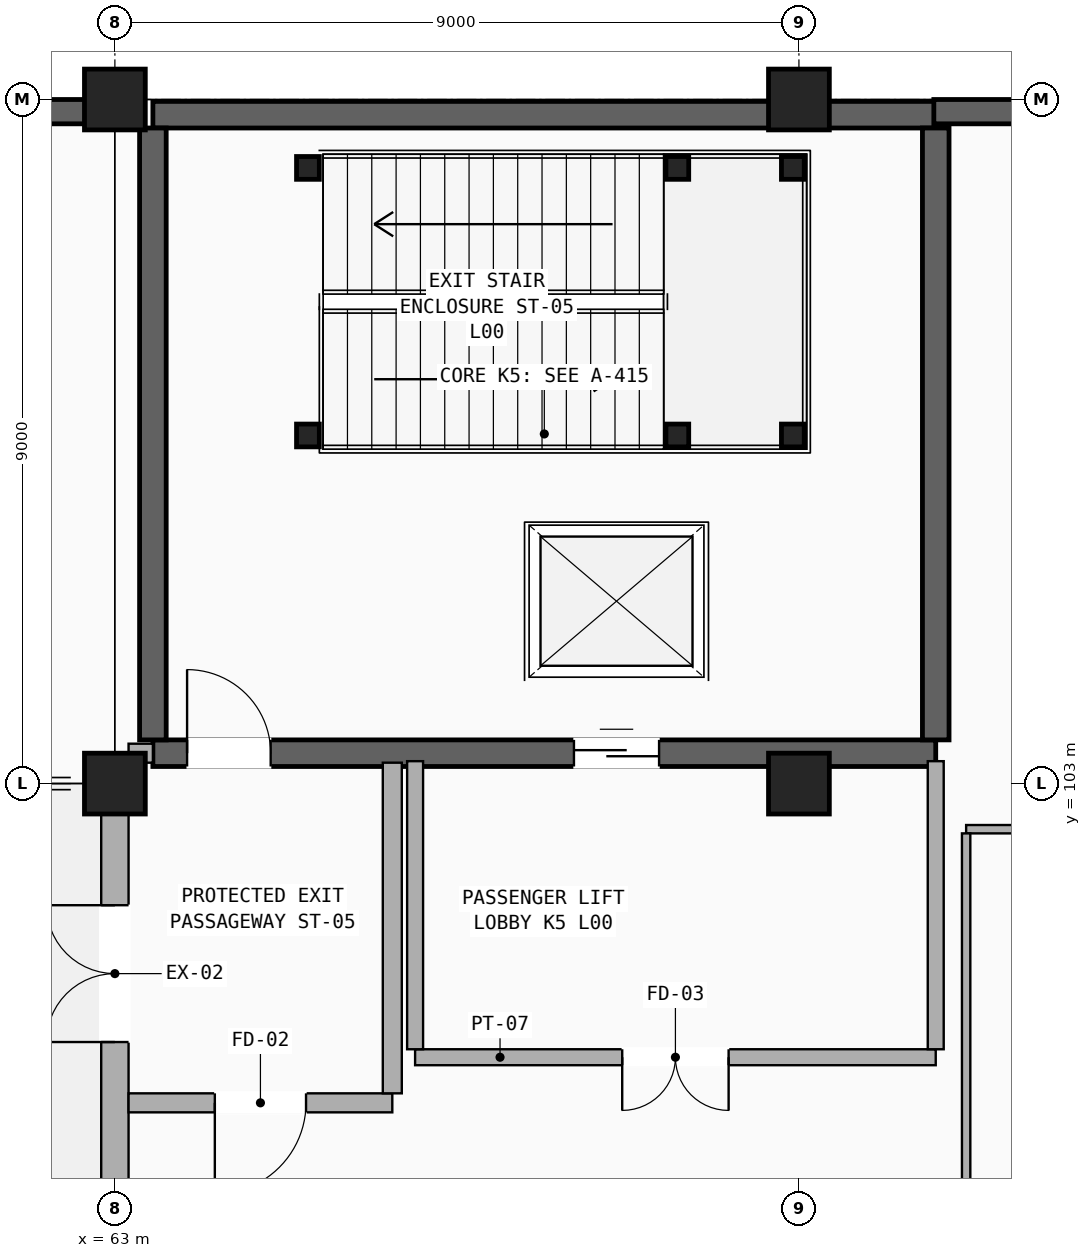
"""IFC4 building model, lengths in metres.
Left out: names, types, materials, properties, quantities, classifications, styles, units other than length and angle.
Written with IfcOpenShell. Run it as: python <this file> out.ifc"""

import sys

from ifc_helpers import new_model, si_unit, direction, frame, frame_2d, origin, origin_2d, place, context, subcontext, project, spatial, rectangle, hollow_rectangle, extrude, element, fill, save


model = new_model("IFC4")
c1 = context("Model", 3, precision=1e-05, world=origin(), true_north=direction((0.0, 1.0)))
c2 = subcontext(c1, "Body", "Model", "MODEL_VIEW")
j1 = project(units=[si_unit("LENGTHUNIT", "METRE"), si_unit("PLANEANGLEUNIT", "RADIAN")], contexts=[c1])
p1 = place(None, origin())
s1 = spatial("IfcSite", under=j1, at=p1, CompositionType="ELEMENT")
p2 = place(p1, origin())
s2 = spatial("IfcBuilding", under=s1, at=p2, CompositionType="ELEMENT")
p3 = place(p2, origin())
s3 = spatial("IfcBuildingStorey", under=s2, at=p3, CompositionType="ELEMENT", Elevation=0.0)
for number, where, z_axis, x_axis in (
    (1, (63.0, 103.0, 0.0), (0.0, 0.0, 1.0), (1.0, 0.0, 0.0)),
    (2, (63.0, 112.0, 0.0), (0.0, 0.0, 1.0), (1.0, 0.0, 0.0)),
    (3, (72.0, 103.0, 0.0), (0.0, 0.0, 1.0), (1.0, 0.0, 0.0)),
    (4, (72.0, 112.0, 0.0), (0.0, 0.0, 1.0), (1.0, 0.0, 0.0)),
):
    element("IfcColumn", number, at=place(p3, frame(where, z_axis=z_axis, x_axis=x_axis)), inside=s3, PredefinedType="COLUMN", context=c2, shape_type="SweptSolid", body=[
        extrude(rectangle(XDim=0.8, YDim=0.8, at=origin_2d()), origin(), (0.0, 0.0, 1.0), 5.1),
    ])
p4 = place(p3, frame((63.5, 103.4, 0.0), z_axis=(0.0, 0.0, 1.0), x_axis=(1.0, 0.0, 0.0)))
e5 = element("IfcWall", 5, at=p4, inside=s3, PredefinedType="SHEAR", context=c2, shape_type="SweptSolid", body=[
    extrude(rectangle(XDim=10.3, YDim=0.35, at=frame_2d((5.15, 0.0))), origin(), (0.0, 0.0, 1.0), 5.1),
])
p5 = place(p4, frame((0.45, 0.0, 0.0)))
e6 = element("IfcOpeningElement", 6, at=p5, cuts=e5, PredefinedType="OPENING", context=c2, shape_type="SweptSolid", body=[
    extrude(rectangle(XDim=1.1, YDim=2.2, at=frame_2d((0.55, 1.1))), frame((0.0, 0.185, 0.0), z_axis=(0.0, -1.0, 0.0), x_axis=(1.0, 0.0, 0.0)), (0.0, 0.0, 1.0), 0.37),
])
p6 = place(p4, frame((5.54, 0.0, 0.0)))
e7 = element("IfcOpeningElement", 7, at=p6, cuts=e5, PredefinedType="OPENING", context=c2, shape_type="SweptSolid", body=[
    extrude(rectangle(XDim=1.12, YDim=2.16, at=frame_2d((0.56, 1.08))), frame((0.0, 0.185, 0.0), z_axis=(0.0, -1.0, 0.0), x_axis=(1.0, 0.0, 0.0)), (0.0, 0.0, 1.0), 0.37),
])
p7 = place(p3, frame((63.5, 111.8, 0.0), z_axis=(0.0, 0.0, 1.0), x_axis=(1.0, 0.0, 0.0)))
e8 = element("IfcWall", 8, at=p7, inside=s3, PredefinedType="SHEAR", context=c2, shape_type="SweptSolid", body=[
    extrude(rectangle(XDim=10.3, YDim=0.35, at=frame_2d((5.15, 0.0))), origin(), (0.0, 0.0, 1.0), 5.1),
])
for number, where, z_axis, x_axis in (
    (9, (63.5, 103.575, 0.0), (0.0, 0.0, 1.0), (0.0, 1.0, 0.0)),
    (10, (73.8, 103.575, 0.0), (0.0, 0.0, 1.0), (0.0, 1.0, 0.0)),
):
    element("IfcWall", number, at=place(p3, frame(where, z_axis=z_axis, x_axis=x_axis)), inside=s3, PredefinedType="SHEAR", context=c2, shape_type="SweptSolid", body=[
        extrude(rectangle(XDim=8.05, YDim=0.35, at=frame_2d((4.025, 0.0))), origin(), (0.0, 0.0, 1.0), 5.1),
    ])
p8 = place(p3, frame((0.35, 111.84, 0.0), z_axis=(0.0, 0.0, 1.0), x_axis=(1.0, 0.0, 0.0)))
e11 = element("IfcWall", 11, at=p8, inside=s3, PredefinedType="SHEAR", context=c2, shape_type="SweptSolid", body=[
    extrude(rectangle(XDim=62.95, YDim=0.32, at=frame_2d((31.475, 0.0))), origin(), (0.0, 0.0, 1.0), 5.1),
])
p9 = place(p3, frame((73.775, 111.84, 0.0), z_axis=(0.0, 0.0, 1.0), x_axis=(1.0, 0.0, 0.0)))
e12 = element("IfcWall", 12, at=p9, inside=s3, PredefinedType="SHEAR", context=c2, shape_type="SweptSolid", body=[
    extrude(rectangle(XDim=89.875, YDim=0.32, at=frame_2d((44.938, 0.0))), origin(), (0.0, 0.0, 1.0), 5.1),
])
p10 = place(p3, frame((63.0, 94.4, 0.0), z_axis=(0.0, 0.0, 1.0), x_axis=(0.0, 1.0, 0.0)))
e13 = element("IfcWall", 13, at=p10, inside=s3, PredefinedType="STANDARD", context=c2, shape_type="SweptSolid", body=[
    extrude(rectangle(XDim=8.2, YDim=0.36, at=frame_2d((4.1, 0.0))), origin(), (0.0, 0.0, 1.0), 4.13),
])
p11 = place(p10, frame((5.2, 0.0, 0.0)))
e14 = element("IfcOpeningElement", 14, at=p11, cuts=e13, PredefinedType="OPENING", context=c2, shape_type="SweptSolid", body=[
    extrude(rectangle(XDim=1.8, YDim=2.3, at=frame_2d((0.9, 1.15))), frame((0.0, 0.19, 0.0), z_axis=(0.0, -1.0, 0.0), x_axis=(1.0, 0.0, 0.0)), (0.0, 0.0, 1.0), 0.38),
])
p12 = place(p10, frame((1.25, 0.0, 0.9)))
e15 = element("IfcOpeningElement", 15, at=p12, cuts=e13, PredefinedType="OPENING", context=c2, shape_type="SweptSolid", body=[
    extrude(rectangle(XDim=1.72, YDim=2.15, at=frame_2d((0.86, 1.075))), frame((0.0, 0.19, 0.0), z_axis=(0.0, -1.0, 0.0), x_axis=(1.0, 0.0, 0.0)), (0.0, 0.0, 1.0), 0.38),
])
for number, where, z_axis, x_axis in (
    (16, (65.54, 107.58, 0.0), (0.0, 0.0, 1.0), (1.0, 0.0, 0.0)),
    (17, (65.54, 111.1, 0.0), (0.0, 0.0, 1.0), (1.0, 0.0, 0.0)),
    (18, (70.4, 107.58, 0.0), (0.0, 0.0, 1.0), (1.0, 0.0, 0.0)),
    (19, (70.4, 111.1, 0.0), (0.0, 0.0, 1.0), (1.0, 0.0, 0.0)),
    (20, (71.92, 107.58, 0.0), (0.0, 0.0, 1.0), (1.0, 0.0, 0.0)),
    (21, (71.92, 111.1, 0.0), (0.0, 0.0, 1.0), (1.0, 0.0, 0.0)),
):
    element("IfcColumn", number, at=place(p3, frame(where, z_axis=z_axis, x_axis=x_axis)), inside=s3, PredefinedType="COLUMN", context=c2, shape_type="SweptSolid", body=[
        extrude(hollow_rectangle(XDim=0.3, YDim=0.3, WallThickness=0.016, InnerFilletRadius=0.016, OuterFilletRadius=0.032, at=origin_2d()), origin(), (0.0, 0.0, 1.0), 5.1),
    ])
p13 = place(p3, frame((66.95, 99.4, 0.0), z_axis=(0.0, 0.0, 1.0), x_axis=(1.0, 0.0, 0.0)))
e22 = element("IfcWall", 22, at=p13, inside=s3, PredefinedType="PARTITIONING", context=c2, shape_type="SweptSolid", body=[
    extrude(rectangle(XDim=6.85, YDim=0.21, at=frame_2d((3.425, 0.0))), origin(), (0.0, 0.0, 1.0), 3.98),
])
p14 = place(p13, frame((2.725, 0.0, 0.0)))
e23 = element("IfcOpeningElement", 23, at=p14, cuts=e22, PredefinedType="OPENING", context=c2, shape_type="SweptSolid", body=[
    extrude(rectangle(XDim=1.4, YDim=2.2, at=frame_2d((0.7, 1.1))), frame((0.0, 0.115, 0.0), z_axis=(0.0, -1.0, 0.0), x_axis=(1.0, 0.0, 0.0)), (0.0, 0.0, 1.0), 0.23),
])
p15 = place(p3, frame((66.95, 99.505, 0.0), z_axis=(0.0, 0.0, 1.0), x_axis=(0.0, 1.0, 0.0)))
e24 = element("IfcWall", 24, at=p15, inside=s3, PredefinedType="PARTITIONING", context=c2, shape_type="SweptSolid", body=[
    extrude(rectangle(XDim=3.79, YDim=0.21, at=frame_2d((1.895, 0.0))), origin(), (0.0, 0.0, 1.0), 4.08),
])
p16 = place(p3, frame((73.8, 99.505, 0.0), z_axis=(0.0, 0.0, 1.0), x_axis=(0.0, 1.0, 0.0)))
e25 = element("IfcWall", 25, at=p16, inside=s3, PredefinedType="PARTITIONING", context=c2, shape_type="SweptSolid", body=[
    extrude(rectangle(XDim=3.79, YDim=0.21, at=frame_2d((1.895, 0.0))), origin(), (0.0, 0.0, 1.0), 3.98),
])
p17 = place(p3, frame((74.2, 102.4, 0.0), z_axis=(0.0, 0.0, 1.0), x_axis=(1.0, 0.0, 0.0)))
e26 = element("IfcWall", 26, at=p17, inside=s3, PredefinedType="PARTITIONING", context=c2, shape_type="SweptSolid", body=[
    extrude(rectangle(XDim=37.4, YDim=0.11, at=frame_2d((18.7, 0.0))), origin(), (0.0, 0.0, 1.0), 3.98),
])
p18 = place(p3, frame((74.2, 82.055, 0.0), z_axis=(0.0, 0.0, 1.0), x_axis=(0.0, 1.0, 0.0)))
e27 = element("IfcWall", 27, at=p18, inside=s3, PredefinedType="PARTITIONING", context=c2, shape_type="SweptSolid", body=[
    extrude(rectangle(XDim=20.29, YDim=0.11, at=frame_2d((10.145, 0.0))), origin(), (0.0, 0.0, 1.0), 3.83),
])
p19 = place(p3, frame((63.18, 98.8, 0.0), z_axis=(0.0, 0.0, 1.0), x_axis=(1.0, 0.0, 0.0)))
e28 = element("IfcWall", 28, at=p19, inside=s3, PredefinedType="PARTITIONING", context=c2, shape_type="SweptSolid", body=[
    extrude(rectangle(XDim=3.47, YDim=0.25, at=frame_2d((1.735, 0.0))), origin(), (0.0, 0.0, 1.0), 4.13),
])
p20 = place(p19, frame((1.135, 0.0, 0.0)))
e29 = element("IfcOpeningElement", 29, at=p20, cuts=e28, PredefinedType="OPENING", context=c2, shape_type="SweptSolid", body=[
    extrude(rectangle(XDim=1.2, YDim=2.2, at=frame_2d((0.6, 1.1))), frame((0.0, 0.135, 0.0), z_axis=(0.0, -1.0, 0.0), x_axis=(1.0, 0.0, 0.0)), (0.0, 0.0, 1.0), 0.27),
])
p21 = place(p3, frame((63.18, 103.4, 0.0), z_axis=(0.0, 0.0, 1.0), x_axis=(1.0, 0.0, 0.0)))
e30 = element("IfcWall", 30, at=p21, inside=s3, PredefinedType="PARTITIONING", context=c2, shape_type="SweptSolid", body=[
    extrude(rectangle(XDim=0.32, YDim=0.25, at=frame_2d((0.16, 0.0))), origin(), (0.0, 0.0, 1.0), 3.98),
])
p22 = place(p3, frame((63.18, 102.6, 0.0), z_axis=(0.0, 0.0, 1.0), x_axis=(0.0, 1.0, 0.0)))
e31 = element("IfcWall", 31, at=p22, inside=s3, PredefinedType="PARTITIONING", context=c2, shape_type="SweptSolid", body=[
    extrude(rectangle(XDim=0.675, YDim=0.25, at=frame_2d((0.337, 0.0))), origin(), (0.0, 0.0, 1.0), 3.98),
])
p23 = place(p3, frame((66.65, 98.925, 0.0), z_axis=(0.0, 0.0, 1.0), x_axis=(0.0, 1.0, 0.0)))
e32 = element("IfcWall", 32, at=p23, inside=s3, PredefinedType="PARTITIONING", context=c2, shape_type="SweptSolid", body=[
    extrude(rectangle(XDim=4.35, YDim=0.25, at=frame_2d((2.175, 0.0))), origin(), (0.0, 0.0, 1.0), 4.08),
])
p24 = place(p11, origin())
e33 = element("IfcDoor", 33, at=p24, inside=s3, OperationType="DOUBLE_DOOR_SINGLE_SWING", PredefinedType="DOOR", context=c2, shape_type="SweptSolid", body=[
    extrude(rectangle(XDim=1.8, YDim=2.3, at=frame_2d((0.9, 1.15))), frame((0.0, 0.025, 0.0), z_axis=(0.0, -1.0, 0.0), x_axis=(1.0, 0.0, 0.0)), (0.0, 0.0, 1.0), 0.05),
])
fill(e14, e33)
p25 = place(p5, origin())
e34 = element("IfcDoor", 34, at=p25, inside=s3, OperationType="SINGLE_SWING_LEFT", PredefinedType="DOOR", context=c2, shape_type="SweptSolid", body=[
    extrude(rectangle(XDim=1.1, YDim=2.2, at=frame_2d((0.55, 1.1))), frame((0.0, 0.025, 0.0), z_axis=(0.0, -1.0, 0.0), x_axis=(1.0, 0.0, 0.0)), (0.0, 0.0, 1.0), 0.05),
])
fill(e6, e34)
p26 = place(p6, origin())
e35 = element("IfcDoor", 35, at=p26, inside=s3, OperationType="SLIDING_TO_LEFT", PredefinedType="DOOR", context=c2, shape_type="SweptSolid", body=[
    extrude(rectangle(XDim=1.12, YDim=2.16, at=frame_2d((0.56, 1.08))), frame((0.0, 0.025, 0.0), z_axis=(0.0, -1.0, 0.0), x_axis=(1.0, 0.0, 0.0)), (0.0, 0.0, 1.0), 0.05),
])
fill(e7, e35)
p27 = place(p14, frame((1.4, 0.0, 0.0), z_axis=(0.0, 0.0, 1.0), x_axis=(-1.0, 0.0, 0.0)))
e36 = element("IfcDoor", 36, at=p27, inside=s3, OperationType="DOUBLE_DOOR_SINGLE_SWING", PredefinedType="DOOR", context=c2, shape_type="SweptSolid", body=[
    extrude(rectangle(XDim=1.4, YDim=2.2, at=frame_2d((0.7, 1.1))), frame((0.0, 0.025, 0.0), z_axis=(0.0, -1.0, 0.0), x_axis=(1.0, 0.0, 0.0)), (0.0, 0.0, 1.0), 0.05),
])
fill(e23, e36)
p28 = place(p20, frame((1.2, 0.0, 0.0), z_axis=(0.0, 0.0, 1.0), x_axis=(-1.0, 0.0, 0.0)))
e37 = element("IfcDoor", 37, at=p28, inside=s3, OperationType="SINGLE_SWING_RIGHT", PredefinedType="DOOR", context=c2, shape_type="SweptSolid", body=[
    extrude(rectangle(XDim=1.2, YDim=2.2, at=frame_2d((0.6, 1.1))), frame((0.0, 0.025, 0.0), z_axis=(0.0, -1.0, 0.0), x_axis=(1.0, 0.0, 0.0)), (0.0, 0.0, 1.0), 0.05),
])
fill(e29, e37)
save(model, sys.argv[1])
